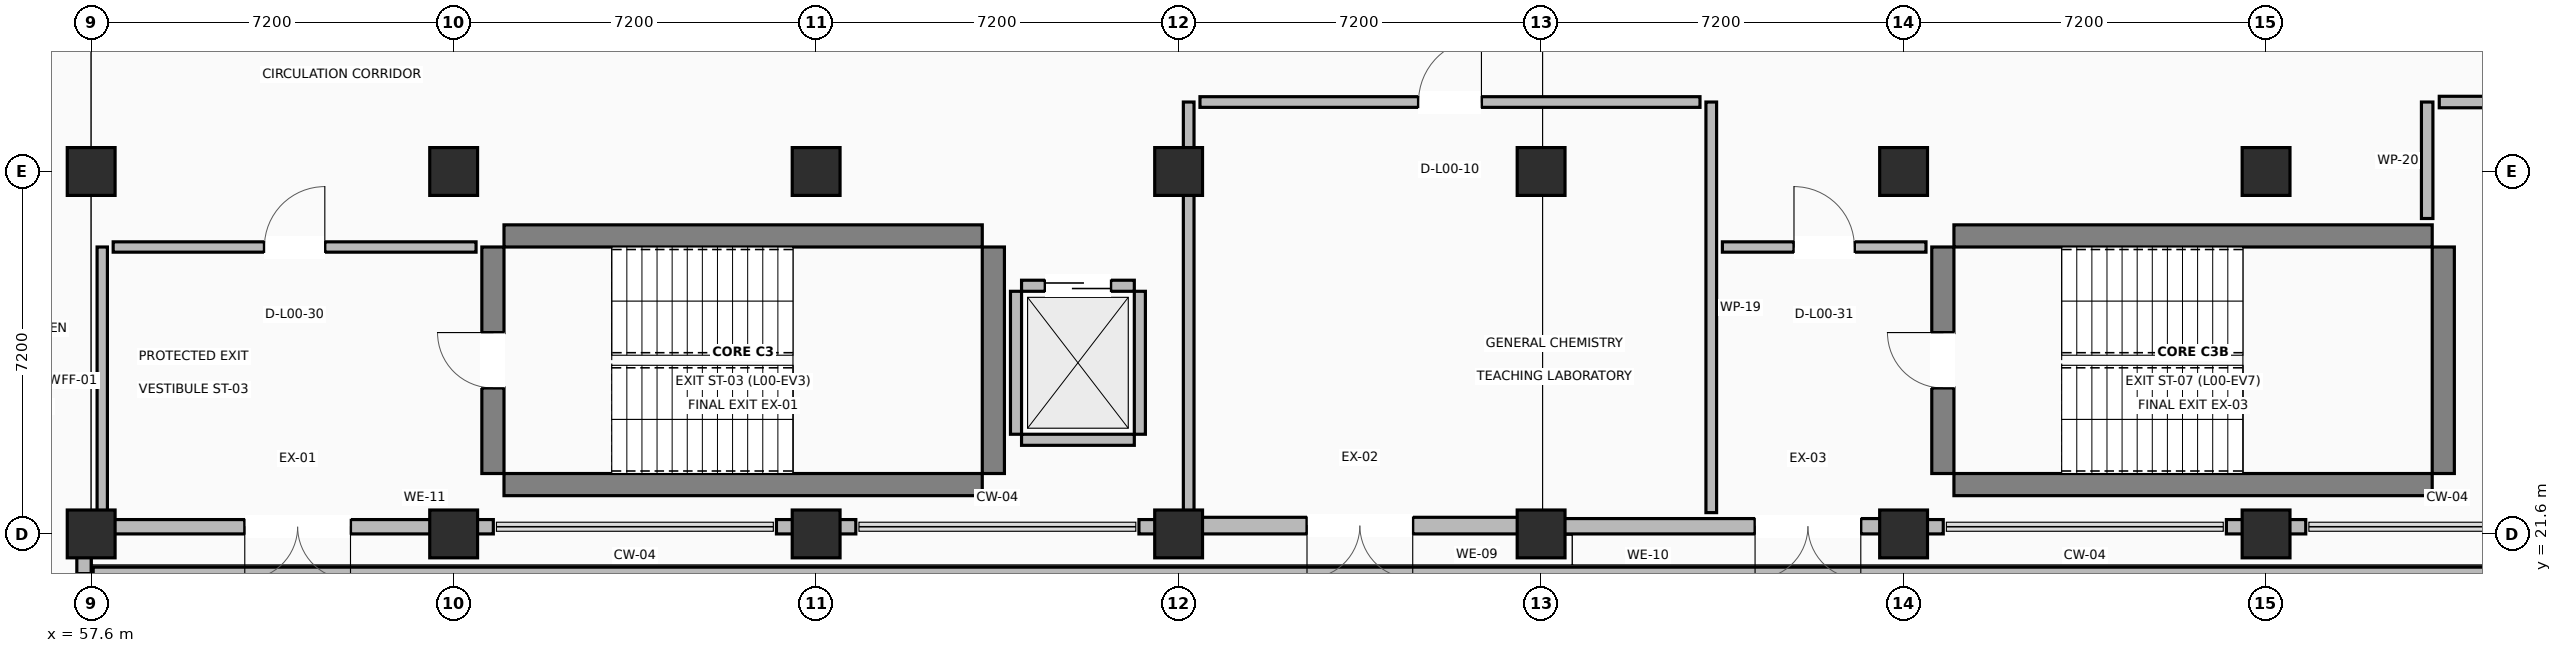
"""IFC4 building model, lengths in metres.
Left out: names, types, materials, properties, quantities, classifications, styles, units other than length and angle.
Written with IfcOpenShell. Run it as: python <this file> out.ifc"""

import sys

from ifc_helpers import new_model, si_unit, direction, frame, frame_2d, origin, origin_2d, place, context, subcontext, project, spatial, rectangle, extrude, element, fill, save


model = new_model("IFC4")
c1 = context("Model", 3, precision=1e-05, world=origin(), true_north=direction((0.0, 1.0)))
c2 = subcontext(c1, "Body", "Model", "MODEL_VIEW")
j1 = project(units=[si_unit("LENGTHUNIT", "METRE"), si_unit("PLANEANGLEUNIT", "RADIAN")], contexts=[c1])
p1 = place(None, origin())
s1 = spatial("IfcSite", under=j1, at=p1, CompositionType="ELEMENT")
p2 = place(p1, origin())
s2 = spatial("IfcBuilding", under=s1, at=p2, CompositionType="ELEMENT")
p3 = place(p2, origin())
s3 = spatial("IfcBuildingStorey", under=s2, at=p3, CompositionType="ELEMENT", Elevation=0.0)
for number, where, z_axis, x_axis in (
    (1, (57.6, 21.6, 0.0), (0.0, 0.0, 1.0), (1.0, 0.0, 0.0)),
    (2, (57.6, 28.8, 0.0), (0.0, 0.0, 1.0), (1.0, 0.0, 0.0)),
    (3, (64.8, 21.6, 0.0), (0.0, 0.0, 1.0), (1.0, 0.0, 0.0)),
    (4, (64.8, 28.8, 0.0), (0.0, 0.0, 1.0), (1.0, 0.0, 0.0)),
    (5, (72.0, 21.6, 0.0), (0.0, 0.0, 1.0), (1.0, 0.0, 0.0)),
    (6, (72.0, 28.8, 0.0), (0.0, 0.0, 1.0), (1.0, 0.0, 0.0)),
    (7, (79.2, 21.6, 0.0), (0.0, 0.0, 1.0), (1.0, 0.0, 0.0)),
    (8, (79.2, 28.8, 0.0), (0.0, 0.0, 1.0), (1.0, 0.0, 0.0)),
    (9, (86.4, 21.6, 0.0), (0.0, 0.0, 1.0), (1.0, 0.0, 0.0)),
    (10, (86.4, 28.8, 0.0), (0.0, 0.0, 1.0), (1.0, 0.0, 0.0)),
    (11, (93.6, 21.6, 0.0), (0.0, 0.0, 1.0), (1.0, 0.0, 0.0)),
    (12, (93.6, 28.8, 0.0), (0.0, 0.0, 1.0), (1.0, 0.0, 0.0)),
    (13, (100.8, 21.6, 0.0), (0.0, 0.0, 1.0), (1.0, 0.0, 0.0)),
    (14, (100.8, 28.8, 0.0), (0.0, 0.0, 1.0), (1.0, 0.0, 0.0)),
):
    element("IfcColumn", number, at=place(p3, frame(where, z_axis=z_axis, x_axis=x_axis)), inside=s3, PredefinedType="COLUMN", context=c2, shape_type="SweptSolid", body=[
        extrude(rectangle(XDim=0.95, YDim=0.95, at=origin_2d()), origin(), (0.0, 0.0, 1.0), 4.22),
    ])
for number, where, z_axis, x_axis in (
    (15, (65.8, 22.58, 0.0), (0.0, 0.0, 1.0), (1.0, 0.0, 0.0)),
    (16, (65.8, 27.52, 0.0), (0.0, 0.0, 1.0), (1.0, 0.0, 0.0)),
):
    element("IfcWall", number, at=place(p3, frame(where, z_axis=z_axis, x_axis=x_axis)), inside=s3, PredefinedType="SHEAR", context=c2, shape_type="SweptSolid", body=[
        extrude(rectangle(XDim=9.5, YDim=0.44, at=frame_2d((4.75, 0.0))), origin(), (0.0, 0.0, 1.0), 4.22),
    ])
p4 = place(p3, frame((65.58, 22.8, 0.0), z_axis=(0.0, 0.0, 1.0), x_axis=(0.0, 1.0, 0.0)))
e17 = element("IfcWall", 17, at=p4, inside=s3, PredefinedType="SHEAR", context=c2, shape_type="SweptSolid", body=[
    extrude(rectangle(XDim=4.5, YDim=0.44, at=frame_2d((2.25, 0.0))), origin(), (0.0, 0.0, 1.0), 4.22),
])
p5 = place(p4, frame((1.7, 0.0, 0.0)))
e18 = element("IfcOpeningElement", 18, at=p5, cuts=e17, PredefinedType="OPENING", context=c2, shape_type="SweptSolid", body=[
    extrude(rectangle(XDim=1.1, YDim=2.15, at=frame_2d((0.55, 1.075))), frame((0.0, 0.23, 0.0), z_axis=(0.0, -1.0, 0.0), x_axis=(1.0, 0.0, 0.0)), (0.0, 0.0, 1.0), 0.46),
])
p6 = place(p3, frame((75.52, 22.8, 0.0), z_axis=(0.0, 0.0, 1.0), x_axis=(0.0, 1.0, 0.0)))
e19 = element("IfcWall", 19, at=p6, inside=s3, PredefinedType="SHEAR", context=c2, shape_type="SweptSolid", body=[
    extrude(rectangle(XDim=4.5, YDim=0.44, at=frame_2d((2.25, 0.0))), origin(), (0.0, 0.0, 1.0), 4.22),
])
for number, where, z_axis, x_axis in (
    (20, (94.6, 22.58, 0.0), (0.0, 0.0, 1.0), (1.0, 0.0, 0.0)),
    (21, (94.6, 27.52, 0.0), (0.0, 0.0, 1.0), (1.0, 0.0, 0.0)),
):
    element("IfcWall", number, at=place(p3, frame(where, z_axis=z_axis, x_axis=x_axis)), inside=s3, PredefinedType="SHEAR", context=c2, shape_type="SweptSolid", body=[
        extrude(rectangle(XDim=9.5, YDim=0.44, at=frame_2d((4.75, 0.0))), origin(), (0.0, 0.0, 1.0), 4.22),
    ])
p7 = place(p3, frame((94.38, 22.8, 0.0), z_axis=(0.0, 0.0, 1.0), x_axis=(0.0, 1.0, 0.0)))
e22 = element("IfcWall", 22, at=p7, inside=s3, PredefinedType="SHEAR", context=c2, shape_type="SweptSolid", body=[
    extrude(rectangle(XDim=4.5, YDim=0.44, at=frame_2d((2.25, 0.0))), origin(), (0.0, 0.0, 1.0), 4.22),
])
p8 = place(p7, frame((1.7, 0.0, 0.0)))
e23 = element("IfcOpeningElement", 23, at=p8, cuts=e22, PredefinedType="OPENING", context=c2, shape_type="SweptSolid", body=[
    extrude(rectangle(XDim=1.1, YDim=2.15, at=frame_2d((0.55, 1.075))), frame((0.0, 0.23, 0.0), z_axis=(0.0, -1.0, 0.0), x_axis=(1.0, 0.0, 0.0)), (0.0, 0.0, 1.0), 0.46),
])
p9 = place(p3, frame((104.32, 22.8, 0.0), z_axis=(0.0, 0.0, 1.0), x_axis=(0.0, 1.0, 0.0)))
e24 = element("IfcWall", 24, at=p9, inside=s3, PredefinedType="SHEAR", context=c2, shape_type="SweptSolid", body=[
    extrude(rectangle(XDim=4.5, YDim=0.44, at=frame_2d((2.25, 0.0))), origin(), (0.0, 0.0, 1.0), 4.22),
])
p10 = place(p3, frame((57.458, 20.812, 0.0), z_axis=(0.0, 0.0, 1.0), x_axis=(0.0, 1.0, 0.0)))
e25 = element("IfcWall", 25, at=p10, inside=s3, PredefinedType="STANDARD", context=c2, shape_type="SweptSolid", body=[
    extrude(rectangle(XDim=0.788, YDim=0.285, at=frame_2d((0.394, 0.0))), origin(), (0.0, 0.0, 1.0), 2.6),
])
p11 = place(p3, frame((64.8, 21.742, 0.0), z_axis=(0.0, 0.0, 1.0), x_axis=(-1.0, 0.0, 0.0)))
e26 = element("IfcWall", 26, at=p11, inside=s3, PredefinedType="STANDARD", context=c2, shape_type="SweptSolid", body=[
    extrude(rectangle(XDim=7.485, YDim=0.285, at=frame_2d((3.743, 0.0))), origin(), (0.0, 0.0, 1.0), 2.6),
])
p12 = place(p11, frame((2.049, 0.0, 0.0)))
e27 = element("IfcOpeningElement", 27, at=p12, cuts=e26, PredefinedType="OPENING", context=c2, shape_type="SweptSolid", body=[
    extrude(rectangle(XDim=2.1, YDim=2.3, at=frame_2d((1.05, 1.15))), frame((0.0, 0.152, 0.0), z_axis=(0.0, -1.0, 0.0), x_axis=(1.0, 0.0, 0.0)), (0.0, 0.0, 1.0), 0.305),
])
p13 = place(p3, frame((86.4, 21.765, 0.0), z_axis=(0.0, 0.0, 1.0), x_axis=(-1.0, 0.0, 0.0)))
e28 = element("IfcWall", 28, at=p13, inside=s3, PredefinedType="STANDARD", context=c2, shape_type="SweptSolid", body=[
    extrude(rectangle(XDim=7.2, YDim=0.33, at=frame_2d((3.6, 0.0))), origin(), (0.0, 0.0, 1.0), 2.6),
])
p14 = place(p13, frame((2.55, 0.0, 0.0)))
e29 = element("IfcOpeningElement", 29, at=p14, cuts=e28, PredefinedType="OPENING", context=c2, shape_type="SweptSolid", body=[
    extrude(rectangle(XDim=2.1, YDim=2.3, at=frame_2d((1.05, 1.15))), frame((0.0, 0.175, 0.0), z_axis=(0.0, -1.0, 0.0), x_axis=(1.0, 0.0, 0.0)), (0.0, 0.0, 1.0), 0.35),
])
p15 = place(p3, frame((93.6, 21.752, 0.0), z_axis=(0.0, 0.0, 1.0), x_axis=(-1.0, 0.0, 0.0)))
e30 = element("IfcWall", 30, at=p15, inside=s3, PredefinedType="STANDARD", context=c2, shape_type="SweptSolid", body=[
    extrude(rectangle(XDim=7.2, YDim=0.305, at=frame_2d((3.6, 0.0))), origin(), (0.0, 0.0, 1.0), 2.6),
])
p16 = place(p15, frame((0.85, 0.0, 0.0)))
e31 = element("IfcOpeningElement", 31, at=p16, cuts=e30, PredefinedType="OPENING", context=c2, shape_type="SweptSolid", body=[
    extrude(rectangle(XDim=2.1, YDim=2.3, at=frame_2d((1.05, 1.15))), frame((0.0, 0.162, 0.0), z_axis=(0.0, -1.0, 0.0), x_axis=(1.0, 0.0, 0.0)), (0.0, 0.0, 1.0), 0.325),
])
p17 = place(p3, frame((64.8, 21.742, 0.0), z_axis=(0.0, 0.0, 1.0), x_axis=(1.0, 0.0, 0.0)))
e32 = element("IfcWall", 32, at=p17, inside=s3, PredefinedType="STANDARD", context=c2, shape_type="SweptSolid", body=[
    extrude(rectangle(XDim=0.788, YDim=0.285, at=frame_2d((0.394, 0.0))), origin(), (0.0, 0.0, 1.0), 2.6),
])
p18 = place(p3, frame((71.212, 21.742, 0.0), z_axis=(0.0, 0.0, 1.0), x_axis=(1.0, 0.0, 0.0)))
e33 = element("IfcWall", 33, at=p18, inside=s3, PredefinedType="STANDARD", context=c2, shape_type="SweptSolid", body=[
    extrude(rectangle(XDim=1.576, YDim=0.285, at=frame_2d((0.788, 0.0))), origin(), (0.0, 0.0, 1.0), 2.6),
])
for number, where, z_axis, x_axis in (
    (34, (78.412, 21.742, 0.0), (0.0, 0.0, 1.0), (1.0, 0.0, 0.0)),
    (35, (93.6, 21.742, 0.0), (0.0, 0.0, 1.0), (1.0, 0.0, 0.0)),
):
    element("IfcWall", number, at=place(p3, frame(where, z_axis=z_axis, x_axis=x_axis)), inside=s3, PredefinedType="STANDARD", context=c2, shape_type="SweptSolid", body=[
        extrude(rectangle(XDim=0.788, YDim=0.285, at=frame_2d((0.394, 0.0))), origin(), (0.0, 0.0, 1.0), 2.6),
    ])
p19 = place(p3, frame((100.012, 21.742, 0.0), z_axis=(0.0, 0.0, 1.0), x_axis=(1.0, 0.0, 0.0)))
e36 = element("IfcWall", 36, at=p19, inside=s3, PredefinedType="STANDARD", context=c2, shape_type="SweptSolid", body=[
    extrude(rectangle(XDim=1.576, YDim=0.285, at=frame_2d((0.788, 0.0))), origin(), (0.0, 0.0, 1.0), 2.6),
])
p20 = place(p3, frame((57.64, 20.83, 0.0), z_axis=(0.0, 0.0, 1.0), x_axis=(1.0, 0.0, 0.0)))
e37 = element("IfcWall", 37, at=p20, inside=s3, PredefinedType="PARAPET", context=c2, shape_type="SweptSolid", body=[
    extrude(rectangle(XDim=57.52, YDim=0.22, at=frame_2d((28.76, 0.0))), origin(), (0.0, 0.0, 1.0), 1.12),
])
p21 = place(p3, frame((76.08, 23.47, 0.0), z_axis=(0.0, 0.0, 1.0), x_axis=(1.0, 0.0, 0.0)))
e38 = element("IfcWall", 38, at=p21, inside=s3, PredefinedType="STANDARD", context=c2, shape_type="SweptSolid", body=[
    extrude(rectangle(XDim=2.24, YDim=0.22, at=frame_2d((1.12, 0.0))), origin(), (0.0, 0.0, 1.0), 2.6),
])
p22 = place(p3, frame((76.08, 26.53, 0.0), z_axis=(0.0, 0.0, 1.0), x_axis=(1.0, 0.0, 0.0)))
e39 = element("IfcWall", 39, at=p22, inside=s3, PredefinedType="STANDARD", context=c2, shape_type="SweptSolid", body=[
    extrude(rectangle(XDim=2.24, YDim=0.22, at=frame_2d((1.12, 0.0))), origin(), (0.0, 0.0, 1.0), 2.6),
])
p23 = place(p22, frame((0.47, 0.0, 0.0)))
e40 = element("IfcOpeningElement", 40, at=p23, cuts=e39, PredefinedType="OPENING", context=c2, shape_type="SweptSolid", body=[
    extrude(rectangle(XDim=1.3, YDim=2.2, at=frame_2d((0.65, 1.1))), frame((0.0, 0.12, 0.0), z_axis=(0.0, -1.0, 0.0), x_axis=(1.0, 0.0, 0.0)), (0.0, 0.0, 1.0), 0.24),
])
for number, where, z_axis, x_axis in (
    (41, (75.97, 23.58, 0.0), (0.0, 0.0, 1.0), (0.0, 1.0, 0.0)),
    (42, (78.43, 23.58, 0.0), (0.0, 0.0, 1.0), (0.0, 1.0, 0.0)),
):
    element("IfcWall", number, at=place(p3, frame(where, z_axis=z_axis, x_axis=x_axis)), inside=s3, PredefinedType="STANDARD", context=c2, shape_type="SweptSolid", body=[
        extrude(rectangle(XDim=2.84, YDim=0.22, at=frame_2d((1.42, 0.0))), origin(), (0.0, 0.0, 1.0), 2.6),
    ])
p24 = place(p3, frame((89.78, 30.18, 0.0), z_axis=(0.0, 0.0, 1.0), x_axis=(0.0, -1.0, 0.0)))
e43 = element("IfcWall", 43, at=p24, inside=s3, PredefinedType="PARTITIONING", context=c2, shape_type="SweptSolid", body=[
    extrude(rectangle(XDim=8.157, YDim=0.212, at=frame_2d((4.079, 0.0))), origin(), (0.0, 0.0, 1.0), 2.6),
])
p25 = place(p3, frame((79.4, 22.048, 0.0), z_axis=(0.0, 0.0, 1.0), x_axis=(0.0, 1.0, 0.0)))
e44 = element("IfcWall", 44, at=p25, inside=s3, PredefinedType="PARTITIONING", context=c2, shape_type="SweptSolid", body=[
    extrude(rectangle(XDim=8.132, YDim=0.212, at=frame_2d((4.066, 0.0))), origin(), (0.0, 0.0, 1.0), 2.6),
])
p26 = place(p3, frame((79.624, 30.18, 0.0), z_axis=(0.0, 0.0, 1.0), x_axis=(1.0, 0.0, 0.0)))
e45 = element("IfcWall", 45, at=p26, inside=s3, PredefinedType="PARTITIONING", context=c2, shape_type="SweptSolid", body=[
    extrude(rectangle(XDim=9.932, YDim=0.212, at=frame_2d((4.966, 0.0))), origin(), (0.0, 0.0, 1.0), 2.6),
])
p27 = place(p26, frame((4.341, 0.0, 0.0)))
e46 = element("IfcOpeningElement", 46, at=p27, cuts=e45, PredefinedType="OPENING", context=c2, shape_type="SweptSolid", body=[
    extrude(rectangle(XDim=1.25, YDim=2.15, at=frame_2d((0.625, 1.075))), frame((0.0, 0.116, 0.0), z_axis=(0.0, -1.0, 0.0), x_axis=(1.0, 0.0, 0.0)), (0.0, 0.0, 1.0), 0.232),
])
p28 = place(p3, frame((104.0, 27.866, 0.0), z_axis=(0.0, 0.0, 1.0), x_axis=(0.0, 1.0, 0.0)))
e47 = element("IfcWall", 47, at=p28, inside=s3, PredefinedType="PARTITIONING", context=c2, shape_type="SweptSolid", body=[
    extrude(rectangle(XDim=2.314, YDim=0.228, at=frame_2d((1.157, 0.0))), origin(), (0.0, 0.0, 1.0), 2.6),
])
p29 = place(p3, frame((104.24, 30.18, 0.0), z_axis=(0.0, 0.0, 1.0), x_axis=(1.0, 0.0, 0.0)))
e48 = element("IfcWall", 48, at=p29, inside=s3, PredefinedType="PARTITIONING", context=c2, shape_type="SweptSolid", body=[
    extrude(rectangle(XDim=10.569, YDim=0.228, at=frame_2d((5.285, 0.0))), origin(), (0.0, 0.0, 1.0), 2.6),
])
p30 = place(p29, frame((4.61, 0.0, 0.0)))
e49 = element("IfcOpeningElement", 49, at=p30, cuts=e48, PredefinedType="OPENING", context=c2, shape_type="SweptSolid", body=[
    extrude(rectangle(XDim=1.35, YDim=2.15, at=frame_2d((0.675, 1.075))), frame((0.0, 0.124, 0.0), z_axis=(0.0, -1.0, 0.0), x_axis=(1.0, 0.0, 0.0)), (0.0, 0.0, 1.0), 0.248),
])
p31 = place(p3, frame((57.82, 21.999, 0.0), z_axis=(0.0, 0.0, 1.0), x_axis=(0.0, 1.0, 0.0)))
e50 = element("IfcWall", 50, at=p31, inside=s3, PredefinedType="PARTITIONING", context=c2, shape_type="SweptSolid", body=[
    extrude(rectangle(XDim=5.301, YDim=0.205, at=frame_2d((2.65, 0.0))), origin(), (0.0, 0.0, 1.0), 2.6),
])
p32 = place(p3, frame((58.037, 27.3, 0.0), z_axis=(0.0, 0.0, 1.0), x_axis=(1.0, 0.0, 0.0)))
e51 = element("IfcWall", 51, at=p32, inside=s3, PredefinedType="PARTITIONING", context=c2, shape_type="SweptSolid", body=[
    extrude(rectangle(XDim=7.208, YDim=0.205, at=frame_2d((3.604, 0.0))), origin(), (0.0, 0.0, 1.0), 2.6),
])
p33 = place(p32, frame((3.004, 0.0, 0.0)))
e52 = element("IfcOpeningElement", 52, at=p33, cuts=e51, PredefinedType="OPENING", context=c2, shape_type="SweptSolid", body=[
    extrude(rectangle(XDim=1.2, YDim=2.15, at=frame_2d((0.6, 1.075))), frame((0.0, 0.113, 0.0), z_axis=(0.0, -1.0, 0.0), x_axis=(1.0, 0.0, 0.0)), (0.0, 0.0, 1.0), 0.225),
])
p34 = place(p3, frame((90.001, 27.3, 0.0), z_axis=(0.0, 0.0, 1.0), x_axis=(1.0, 0.0, 0.0)))
e53 = element("IfcWall", 53, at=p34, inside=s3, PredefinedType="PARTITIONING", context=c2, shape_type="SweptSolid", body=[
    extrude(rectangle(XDim=4.044, YDim=0.205, at=frame_2d((2.022, 0.0))), origin(), (0.0, 0.0, 1.0), 2.6),
])
p35 = place(p34, frame((1.422, 0.0, 0.0)))
e54 = element("IfcOpeningElement", 54, at=p35, cuts=e53, PredefinedType="OPENING", context=c2, shape_type="SweptSolid", body=[
    extrude(rectangle(XDim=1.2, YDim=2.15, at=frame_2d((0.6, 1.075))), frame((0.0, 0.113, 0.0), z_axis=(0.0, -1.0, 0.0), x_axis=(1.0, 0.0, 0.0)), (0.0, 0.0, 1.0), 0.225),
])
p36 = place(p12, origin())
e55 = element("IfcDoor", 55, at=p36, inside=s3, OperationType="DOUBLE_DOOR_SINGLE_SWING", PredefinedType="DOOR", context=c2, shape_type="SweptSolid", body=[
    extrude(rectangle(XDim=2.1, YDim=2.3, at=frame_2d((1.05, 1.15))), frame((0.0, 0.025, 0.0), z_axis=(0.0, -1.0, 0.0), x_axis=(1.0, 0.0, 0.0)), (0.0, 0.0, 1.0), 0.05),
])
fill(e27, e55)
p37 = place(p14, origin())
e56 = element("IfcDoor", 56, at=p37, inside=s3, OperationType="DOUBLE_DOOR_SINGLE_SWING", PredefinedType="DOOR", context=c2, shape_type="SweptSolid", body=[
    extrude(rectangle(XDim=2.1, YDim=2.3, at=frame_2d((1.05, 1.15))), frame((0.0, 0.025, 0.0), z_axis=(0.0, -1.0, 0.0), x_axis=(1.0, 0.0, 0.0)), (0.0, 0.0, 1.0), 0.05),
])
fill(e29, e56)
p38 = place(p16, origin())
e57 = element("IfcDoor", 57, at=p38, inside=s3, OperationType="DOUBLE_DOOR_SINGLE_SWING", PredefinedType="DOOR", context=c2, shape_type="SweptSolid", body=[
    extrude(rectangle(XDim=2.1, YDim=2.3, at=frame_2d((1.05, 1.15))), frame((0.0, 0.025, 0.0), z_axis=(0.0, -1.0, 0.0), x_axis=(1.0, 0.0, 0.0)), (0.0, 0.0, 1.0), 0.05),
])
fill(e31, e57)
p39 = place(p5, origin())
e58 = element("IfcDoor", 58, at=p39, inside=s3, OperationType="SINGLE_SWING_RIGHT", PredefinedType="DOOR", context=c2, shape_type="SweptSolid", body=[
    extrude(rectangle(XDim=1.1, YDim=2.15, at=frame_2d((0.55, 1.075))), frame((0.0, 0.025, 0.0), z_axis=(0.0, -1.0, 0.0), x_axis=(1.0, 0.0, 0.0)), (0.0, 0.0, 1.0), 0.05),
])
fill(e18, e58)
p40 = place(p8, origin())
e59 = element("IfcDoor", 59, at=p40, inside=s3, OperationType="SINGLE_SWING_RIGHT", PredefinedType="DOOR", context=c2, shape_type="SweptSolid", body=[
    extrude(rectangle(XDim=1.1, YDim=2.15, at=frame_2d((0.55, 1.075))), frame((0.0, 0.025, 0.0), z_axis=(0.0, -1.0, 0.0), x_axis=(1.0, 0.0, 0.0)), (0.0, 0.0, 1.0), 0.05),
])
fill(e23, e59)
p41 = place(p23, origin())
e60 = element("IfcDoor", 60, at=p41, inside=s3, OperationType="SLIDING_TO_RIGHT", PredefinedType="DOOR", context=c2, shape_type="SweptSolid", body=[
    extrude(rectangle(XDim=1.3, YDim=2.2, at=frame_2d((0.65, 1.1))), frame((0.0, 0.025, 0.0), z_axis=(0.0, -1.0, 0.0), x_axis=(1.0, 0.0, 0.0)), (0.0, 0.0, 1.0), 0.05),
])
fill(e40, e60)
p42 = place(p27, origin())
e61 = element("IfcDoor", 61, at=p42, inside=s3, OperationType="SINGLE_SWING_RIGHT", PredefinedType="DOOR", context=c2, shape_type="SweptSolid", body=[
    extrude(rectangle(XDim=1.25, YDim=2.15, at=frame_2d((0.625, 1.075))), frame((0.0, 0.025, 0.0), z_axis=(0.0, -1.0, 0.0), x_axis=(1.0, 0.0, 0.0)), (0.0, 0.0, 1.0), 0.05),
])
fill(e46, e61)
p43 = place(p33, origin())
e62 = element("IfcDoor", 62, at=p43, inside=s3, OperationType="SINGLE_SWING_RIGHT", PredefinedType="DOOR", context=c2, shape_type="SweptSolid", body=[
    extrude(rectangle(XDim=1.2, YDim=2.15, at=frame_2d((0.6, 1.075))), frame((0.0, 0.025, 0.0), z_axis=(0.0, -1.0, 0.0), x_axis=(1.0, 0.0, 0.0)), (0.0, 0.0, 1.0), 0.05),
])
fill(e52, e62)
p44 = place(p35, origin())
e63 = element("IfcDoor", 63, at=p44, inside=s3, OperationType="SINGLE_SWING_LEFT", PredefinedType="DOOR", context=c2, shape_type="SweptSolid", body=[
    extrude(rectangle(XDim=1.2, YDim=2.15, at=frame_2d((0.6, 1.075))), frame((0.0, 0.025, 0.0), z_axis=(0.0, -1.0, 0.0), x_axis=(1.0, 0.0, 0.0)), (0.0, 0.0, 1.0), 0.05),
])
fill(e54, e63)
save(model, sys.argv[1])
